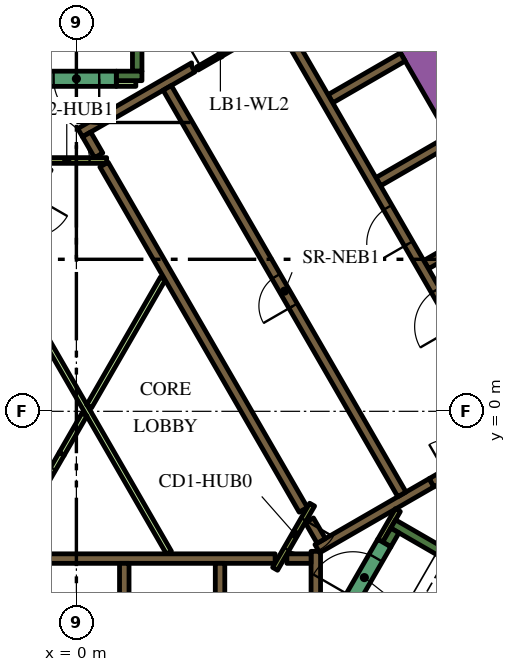
"""IFC4 building model, lengths in metres.
Left out: names, types, materials, properties, quantities, classifications, styles, units other than length and angle.
Written with IfcOpenShell. Run it as: python <this file> out.ifc"""

import sys

from ifc_helpers import new_model, si_unit, direction, frame, frame_2d, origin, place, context, subcontext, project, spatial, polyline, rectangle, outline, extrude, element, fill, save


model = new_model("IFC4")
c1 = context("Model", 3, precision=1e-05, world=origin(), true_north=direction((0.0, 1.0)))
c2 = subcontext(c1, "Body", "Model", "MODEL_VIEW")
j1 = project(units=[si_unit("LENGTHUNIT", "METRE"), si_unit("PLANEANGLEUNIT", "RADIAN")], contexts=[c1])
p1 = place(None, origin())
s1 = spatial("IfcSite", under=j1, at=p1, CompositionType="ELEMENT")
p2 = place(p1, origin())
s2 = spatial("IfcBuilding", under=s1, at=p2, CompositionType="ELEMENT")
p3 = place(p2, frame((0.0, 0.0, 43.2)))
s3 = spatial("IfcBuildingStorey", under=s2, at=p3, CompositionType="ELEMENT", Elevation=43.2)
p4 = place(p3, frame((6.776, 13.364, 0.0), z_axis=(0.0, 0.0, 1.0), x_axis=(0.500004177138, -0.8660229921, 0.0)))
e1 = element("IfcWall", 1, at=p4, inside=s3, PredefinedType="SOLIDWALL", context=c2, shape_type="SweptSolid", body=[
    extrude(rectangle(XDim=20.204, YDim=0.9, at=frame_2d((10.102, 0.0))), origin(), (0.0, 0.0, 1.0), 3.9),
])
p5 = place(p3, frame((8.334, -2.964, 0.0), z_axis=(0.0, 0.0, 1.0), x_axis=(0.866016039709, -0.500016218704, 0.0)))
e2 = element("IfcWall", 2, at=p5, inside=s3, PredefinedType="SOLIDWALL", context=c2, shape_type="SweptSolid", body=[
    extrude(rectangle(XDim=7.05, YDim=0.25, at=frame_2d((3.525, 0.0))), origin(), (0.0, 0.0, 1.0), 3.9),
])
p6 = place(p3, frame((8.168, -3.503, 0.0), z_axis=(0.0, 0.0, 1.0), x_axis=(0.49972245349, 0.866185586049, 0.0)))
e3 = element("IfcWall", 3, at=p6, inside=s3, PredefinedType="SOLIDWALL", context=c2, shape_type="SweptSolid", body=[
    extrude(rectangle(XDim=0.425, YDim=0.25, at=frame_2d((0.212, 0.0))), origin(), (0.0, 0.0, 1.0), 3.9),
])
p7 = place(p3, frame((1.6, 8.95, 0.0), z_axis=(0.0, 0.0, 1.0), x_axis=(0.0, 1.0, 0.0)))
e4 = element("IfcWall", 4, at=p7, inside=s3, PredefinedType="SOLIDWALL", context=c2, shape_type="SweptSolid", body=[
    extrude(rectangle(XDim=6.8, YDim=0.25, at=frame_2d((3.4, 0.0))), origin(), (0.0, 0.0, 1.0), 3.9),
])
p8 = place(p3, frame((1.05, 8.825, 0.0), z_axis=(0.0, 0.0, 1.0), x_axis=(1.0, 0.0, 0.0)))
e5 = element("IfcWall", 5, at=p8, inside=s3, PredefinedType="SOLIDWALL", context=c2, shape_type="SweptSolid", body=[
    extrude(rectangle(XDim=0.675, YDim=0.25, at=frame_2d((0.337, 0.0))), origin(), (0.0, 0.0, 1.0), 3.9),
])
p9 = place(p3, frame((-5.259, -3.875, 0.0), z_axis=(0.0, 0.0, 1.0), x_axis=(1.0, 0.0, 0.0)))
e6 = element("IfcWall", 6, at=p9, inside=s3, PredefinedType="SOLIDWALL", context=c2, shape_type="SweptSolid", body=[
    extrude(rectangle(XDim=10.489, YDim=0.25, at=frame_2d((5.244, 0.0))), origin(), (0.0, 0.0, 1.0), 3.9),
])
for number, where, z_axis, x_axis in (
    (7, (3.78, -4.0, 0.0), (0.0, 0.0, 1.0), (0.0, -1.0, 0.0)),
    (8, (1.26, -4.0, 0.0), (0.0, 0.0, 1.0), (0.0, -1.0, 0.0)),
):
    element("IfcWall", number, at=place(p3, frame(where, z_axis=z_axis, x_axis=x_axis)), inside=s3, PredefinedType="SOLIDWALL", context=c2, shape_type="SweptSolid", body=[
        extrude(rectangle(XDim=2.2, YDim=0.25, at=frame_2d((1.1, 0.0))), origin(), (0.0, 0.0, 1.0), 3.9),
    ])
p10 = place(p3, frame((6.3, -7.27, 0.0), z_axis=(0.0, 0.0, 1.0), x_axis=(0.0, 1.0, 0.0)))
e9 = element("IfcWall", 9, at=p10, inside=s3, PredefinedType="SOLIDWALL", context=c2, shape_type="SweptSolid", body=[
    extrude(rectangle(XDim=3.586, YDim=0.25, at=frame_2d((1.793, 0.0))), origin(), (0.0, 0.0, 1.0), 3.9),
])
p11 = place(p3, frame((5.538, -3.875, 0.0), z_axis=(0.0, 0.0, 1.0), x_axis=(1.0, 0.0, 0.0)))
e10 = element("IfcWall", 10, at=p11, inside=s3, PredefinedType="SOLIDWALL", context=c2, shape_type="SweptSolid", body=[
    extrude(rectangle(XDim=0.637, YDim=0.25, at=frame_2d((0.318, 0.0))), origin(), (0.0, 0.0, 1.0), 3.9),
])
p12 = place(p3, frame((9.346, -1.879, 0.0), z_axis=(0.0, 0.0, 1.0), x_axis=(-0.866048528039, -0.499959945477, 0.0)))
e11 = element("IfcWall", 11, at=p12, inside=s3, PredefinedType="SOLIDWALL", context=c2, shape_type="SweptSolid", body=[
    extrude(rectangle(XDim=3.47, YDim=0.25, at=frame_2d((1.735, 0.0))), origin(), (0.0, 0.0, 1.0), 3.9),
])
p13 = place(p3, frame((6.13, -2.867, 0.0), z_axis=(0.0, 0.0, 1.0), x_axis=(0.500160776593, -0.865932559475, 0.0)))
e12 = element("IfcWall", 12, at=p13, inside=s3, PredefinedType="SOLIDWALL", context=c2, shape_type="SweptSolid", body=[
    extrude(rectangle(XDim=0.627, YDim=0.25, at=frame_2d((0.313, 0.0))), origin(), (0.0, 0.0, 1.0), 3.9),
])
for number, where, z_axis, x_axis in (
    (13, (9.204, 3.859, 0.0), (0.0, 0.0, 1.0), (0.866, 0.5, 0.0)),
    (14, (7.944, 6.041, 0.0), (0.0, 0.0, 1.0), (0.866, 0.5, 0.0)),
    (15, (6.684, 8.224, 0.0), (0.0, 0.0, 1.0), (0.866, 0.5, 0.0)),
):
    element("IfcWall", number, at=place(p3, frame(where, z_axis=z_axis, x_axis=x_axis)), inside=s3, PredefinedType="SOLIDWALL", context=c2, shape_type="SweptSolid", body=[
        extrude(rectangle(XDim=2.2, YDim=0.25, at=frame_2d((1.1, 0.0))), origin(), (0.0, 0.0, 1.0), 3.9),
    ])
p14 = place(p3, origin())
e16 = element("IfcWall", 16, at=p14, inside=s3, PredefinedType="SOLIDWALL", context=c2, shape_type="SweptSolid", body=[
    extrude(outline(polyline([(2.776, 8.733), (2.499, 8.573), (2.498, 8.573), (2.498, 8.573), (2.282, 8.448), (2.282, 8.448), (0.377, 7.348), (0.16, 7.223), (0.035, 7.439), (3.032, 9.169), (3.03, 9.152), (3.03, 9.133), (3.031, 9.113), (3.035, 9.094), (3.04, 9.075), (3.047, 9.057), (3.056, 9.039), (3.119, 8.931), (2.776, 8.733)])), origin(), (0.0, 0.0, 1.0), 3.9),
])
p15 = place(p3, frame((0.268, 7.285, 0.0), z_axis=(0.0, 0.0, 1.0), x_axis=(0.500098681536, -0.865968422476, 0.0)))
e17 = element("IfcWall", 17, at=p15, inside=s3, PredefinedType="SOLIDWALL", context=c2, shape_type="SweptSolid", body=[
    extrude(rectangle(XDim=0.636, YDim=0.25, at=frame_2d((0.318, 0.0))), origin(), (0.0, 0.0, 1.0), 3.9),
])
p16 = place(p3, frame((5.97, -2.591, 0.0), z_axis=(0.0, 0.0, 1.0), x_axis=(-0.499994469932, 0.866028596547, 0.0)))
e18 = element("IfcWall", 18, at=p16, inside=s3, PredefinedType="SOLIDWALL", context=c2, shape_type="SweptSolid", body=[
    extrude(rectangle(XDim=10.488, YDim=0.25, at=frame_2d((5.244, 0.0))), origin(), (0.0, 0.0, 1.0), 3.9),
])
p17 = place(p3, frame((8.459, -2.599, 0.0), z_axis=(0.0, 0.0, 1.0), x_axis=(-0.500041054325, -0.866001699761, 0.0)))
e19 = element("IfcWall", 19, at=p17, inside=s3, PredefinedType="PARTITIONING", context=c2, shape_type="SweptSolid", body=[
    extrude(rectangle(XDim=0.929, YDim=0.15, at=frame_2d((0.464, 0.0))), origin(), (0.0, 0.0, 1.0), 3.9),
])
p18 = place(p3, frame((2.435, -3.718, 0.0), z_axis=(0.0, 0.0, 1.0), x_axis=(-0.499985176046, 0.866033962229, 0.0)))
e20 = element("IfcWall", 20, at=p18, inside=s3, PredefinedType="PARTITIONING", context=c2, shape_type="SweptSolid", body=[
    extrude(rectangle(XDim=8.875, YDim=0.15, at=frame_2d((4.438, 0.0))), origin(), (0.0, 0.0, 1.0), 2.75),
])
p19 = place(p3, frame((0.336, 0.132, 0.0), z_axis=(0.0, 0.0, 1.0), x_axis=(0.500001957507, 0.866024273614, 0.0)))
e21 = element("IfcWall", 21, at=p19, inside=s3, PredefinedType="PARTITIONING", context=c2, shape_type="SweptSolid", body=[
    extrude(rectangle(XDim=3.881, YDim=0.15, at=frame_2d((1.941, 0.0))), origin(), (0.0, 0.0, 1.0), 2.75),
])
p20 = place(p3, frame((-0.387, -1.121, 0.0), z_axis=(0.0, 0.0, 1.0), x_axis=(0.500057179532, 0.865992388649, 0.0)))
e22 = element("IfcWall", 22, at=p20, inside=s3, PredefinedType="PARTITIONING", context=c2, shape_type="SweptSolid", body=[
    extrude(rectangle(XDim=1.199, YDim=0.15, at=frame_2d((0.6, 0.0))), origin(), (0.0, 0.0, 1.0), 2.75),
])
p21 = place(p3, frame((1.05, 8.625, 0.0), z_axis=(0.0, 0.0, 1.0), x_axis=(1.0, 0.0, 0.0)))
e23 = element("IfcWall", 23, at=p21, inside=s3, PredefinedType="PARTITIONING", context=c2, shape_type="SweptSolid", body=[
    extrude(rectangle(XDim=0.514, YDim=0.15, at=frame_2d((0.257, 0.0))), origin(), (0.0, 0.0, 1.0), 2.75),
])
p22 = place(p3, frame((11.553, -0.46, 0.0), z_axis=(0.0, 0.0, 1.0), x_axis=(-0.500006514828, 0.866021642414, 0.0)))
e24 = element("IfcWall", 24, at=p22, inside=s3, PredefinedType="SOLIDWALL", context=c2, shape_type="SweptSolid", body=[
    extrude(rectangle(XDim=12.35, YDim=0.25, at=frame_2d((6.175, 0.0))), origin(), (0.0, 0.0, 1.0), 3.9),
])
p23 = place(p22, frame((0.585, 0.0, 0.0)))
e25 = element("IfcOpeningElement", 25, at=p23, cuts=e24, PredefinedType="OPENING", context=c2, shape_type="SweptSolid", body=[
    extrude(rectangle(XDim=1.1, YDim=2.1, at=frame_2d((0.55, 1.05))), frame((0.0, 0.135, 0.0), z_axis=(0.0, -1.0, 0.0), x_axis=(1.0, 0.0, 0.0)), (0.0, 0.0, 1.0), 0.27),
])
p24 = place(p22, frame((3.105, 0.0, 0.0)))
e26 = element("IfcOpeningElement", 26, at=p24, cuts=e24, PredefinedType="OPENING", context=c2, shape_type="SweptSolid", body=[
    extrude(rectangle(XDim=1.1, YDim=2.1, at=frame_2d((0.55, 1.05))), frame((0.0, 0.135, 0.0), z_axis=(0.0, -1.0, 0.0), x_axis=(1.0, 0.0, 0.0)), (0.0, 0.0, 1.0), 0.27),
])
p25 = place(p22, frame((5.625, 0.0, 0.0)))
e27 = element("IfcOpeningElement", 27, at=p25, cuts=e24, PredefinedType="OPENING", context=c2, shape_type="SweptSolid", body=[
    extrude(rectangle(XDim=1.1, YDim=2.1, at=frame_2d((0.55, 1.05))), frame((0.0, 0.135, 0.0), z_axis=(0.0, -1.0, 0.0), x_axis=(1.0, 0.0, 0.0)), (0.0, 0.0, 1.0), 0.27),
])
p26 = place(p3, frame((8.565, -2.185, 0.0), z_axis=(0.0, 0.0, 1.0), x_axis=(-0.499997954832, 0.866026584559, 0.0)))
e28 = element("IfcWall", 28, at=p26, inside=s3, PredefinedType="SOLIDWALL", context=c2, shape_type="SweptSolid", body=[
    extrude(rectangle(XDim=12.35, YDim=0.25, at=frame_2d((6.175, 0.0))), origin(), (0.0, 0.0, 1.0), 3.9),
])
p27 = place(p26, frame((5.725, 0.0, 0.0)))
e29 = element("IfcOpeningElement", 29, at=p27, cuts=e28, PredefinedType="OPENING", context=c2, shape_type="SweptSolid", body=[
    extrude(rectangle(XDim=0.9, YDim=2.1, at=frame_2d((0.45, 1.05))), frame((0.0, 0.135, 0.0), z_axis=(0.0, -1.0, 0.0), x_axis=(1.0, 0.0, 0.0)), (0.0, 0.0, 1.0), 0.27),
])
p28 = place(p3, frame((7.053, -5.284, 0.0), z_axis=(0.0, 0.0, 1.0), x_axis=(0.500078061341, 0.865980330357, 0.0)))
e30 = element("IfcWall", 30, at=p28, inside=s3, PredefinedType="SOLIDWALL", context=c2, shape_type="SweptSolid", body=[
    extrude(rectangle(XDim=2.1, YDim=0.4, at=frame_2d((1.05, 0.0))), origin(), (0.0, 0.0, 1.0), 3.9),
])
p29 = place(p28, frame((0.45, 0.0, 0.0)))
e31 = element("IfcOpeningElement", 31, at=p29, cuts=e30, PredefinedType="OPENING", context=c2, shape_type="SweptSolid", body=[
    extrude(rectangle(XDim=1.2, YDim=2.1, at=frame_2d((0.6, 1.05))), frame((0.0, 0.21, 0.0), z_axis=(0.0, -1.0, 0.0), x_axis=(1.0, 0.0, 0.0)), (0.0, 0.0, 1.0), 0.42),
])
p30 = place(p3, frame((9.346, -1.879, 0.0), z_axis=(0.0, 0.0, 1.0), x_axis=(0.866047807691, 0.499961193289, 0.0)))
e32 = element("IfcWall", 32, at=p30, inside=s3, PredefinedType="SOLIDWALL", context=c2, shape_type="SweptSolid", body=[
    extrude(rectangle(XDim=1.8, YDim=0.25, at=frame_2d((0.9, 0.0))), origin(), (0.0, 0.0, 1.0), 3.9),
])
p31 = place(p30, frame((0.45, 0.0, 0.0)))
e33 = element("IfcOpeningElement", 33, at=p31, cuts=e32, PredefinedType="OPENING", context=c2, shape_type="SweptSolid", body=[
    extrude(rectangle(XDim=0.9, YDim=2.1, at=frame_2d((0.45, 1.05))), frame((0.0, 0.135, 0.0), z_axis=(0.0, -1.0, 0.0), x_axis=(1.0, 0.0, 0.0)), (0.0, 0.0, 1.0), 0.27),
])
p32 = place(p3, frame((1.05, 8.75, 0.0), z_axis=(0.0, 0.0, 1.0), x_axis=(-1.0, 0.0, 0.0)))
e34 = element("IfcWall", 34, at=p32, inside=s3, PredefinedType="SOLIDWALL", context=c2, shape_type="SweptSolid", body=[
    extrude(rectangle(XDim=2.1, YDim=0.4, at=frame_2d((1.05, 0.0))), origin(), (0.0, 0.0, 1.0), 3.9),
])
p33 = place(p32, frame((0.45, 0.0, 0.0)))
e35 = element("IfcOpeningElement", 35, at=p33, cuts=e34, PredefinedType="OPENING", context=c2, shape_type="SweptSolid", body=[
    extrude(rectangle(XDim=1.2, YDim=2.1, at=frame_2d((0.6, 1.05))), frame((0.0, 0.21, 0.0), z_axis=(0.0, -1.0, 0.0), x_axis=(1.0, 0.0, 0.0)), (0.0, 0.0, 1.0), 0.42),
])
p34 = place(p3, frame((6.203, -2.456, 0.0), z_axis=(0.0, 0.0, 1.0), x_axis=(-0.500043961785, -0.866000020948, 0.0)))
e36 = element("IfcWall", 36, at=p34, inside=s3, PredefinedType="PARTITIONING", context=c2, shape_type="SweptSolid", body=[
    extrude(rectangle(XDim=1.95, YDim=0.15, at=frame_2d((0.975, 0.0))), origin(), (0.0, 0.0, 1.0), 3.9),
])
p35 = place(p34, frame((0.45, 0.0, 0.0)))
e37 = element("IfcOpeningElement", 37, at=p35, cuts=e36, PredefinedType="OPENING", context=c2, shape_type="SweptSolid", body=[
    extrude(rectangle(XDim=0.9, YDim=2.1, at=frame_2d((0.45, 1.05))), frame((0.0, 0.085, 0.0), z_axis=(0.0, -1.0, 0.0), x_axis=(1.0, 0.0, 0.0)), (0.0, 0.0, 1.0), 0.17),
])
p36 = place(p3, frame((-1.303, 6.6, 0.0), z_axis=(0.0, 0.0, 1.0), x_axis=(1.0, 0.0, 0.0)))
e38 = element("IfcWall", 38, at=p36, inside=s3, PredefinedType="PARTITIONING", context=c2, shape_type="SweptSolid", body=[
    extrude(rectangle(XDim=2.1, YDim=0.15, at=frame_2d((1.05, 0.0))), origin(), (0.0, 0.0, 1.0), 3.9),
])
p37 = place(p36, frame((0.45, 0.0, 0.0)))
e39 = element("IfcOpeningElement", 39, at=p37, cuts=e38, PredefinedType="OPENING", context=c2, shape_type="SweptSolid", body=[
    extrude(rectangle(XDim=1.2, YDim=2.1, at=frame_2d((0.6, 1.05))), frame((0.0, 0.085, 0.0), z_axis=(0.0, -1.0, 0.0), x_axis=(1.0, 0.0, 0.0)), (0.0, 0.0, 1.0), 0.17),
])
p38 = place(p3, frame((3.183, 9.02, 0.0), z_axis=(0.0, 0.0, 1.0), x_axis=(0.866034573852, 0.49998411664, 0.0)))
e40 = element("IfcWall", 40, at=p38, inside=s3, PredefinedType="PARTITIONING", context=c2, shape_type="SweptSolid", body=[
    extrude(rectangle(XDim=1.4, YDim=0.09, at=frame_2d((0.7, 0.0))), origin(), (0.0, 0.0, 1.0), 2.75),
])
p39 = place(p38, frame((0.1, 0.0, 0.0)))
e41 = element("IfcOpeningElement", 41, at=p39, cuts=e40, PredefinedType="OPENING", context=c2, shape_type="SweptSolid", body=[
    extrude(rectangle(XDim=1.2, YDim=2.1, at=frame_2d((0.6, 1.05))), frame((0.0, 0.055, 0.0), z_axis=(0.0, -1.0, 0.0), x_axis=(1.0, 0.0, 0.0)), (0.0, 0.0, 1.0), 0.11),
])
p40 = place(p3, frame((-1.287, -2.679, 0.0), z_axis=(0.0, 0.0, 1.0), x_axis=(0.499961193289, 0.866047807691, 0.0)))
e42 = element("IfcWall", 42, at=p40, inside=s3, PredefinedType="PARTITIONING", context=c2, shape_type="SweptSolid", body=[
    extrude(rectangle(XDim=1.8, YDim=0.15, at=frame_2d((0.9, 0.0))), origin(), (0.0, 0.0, 1.0), 2.75),
])
p41 = place(p40, frame((0.45, 0.0, 0.0)))
e43 = element("IfcOpeningElement", 43, at=p41, cuts=e42, PredefinedType="OPENING", context=c2, shape_type="SweptSolid", body=[
    extrude(rectangle(XDim=0.9, YDim=2.1, at=frame_2d((0.45, 1.05))), frame((0.0, 0.085, 0.0), z_axis=(0.0, -1.0, 0.0), x_axis=(1.0, 0.0, 0.0)), (0.0, 0.0, 1.0), 0.17),
])
p42 = place(p3, frame((6.163, 18.475, 0.0), z_axis=(0.0, 0.0, 1.0), x_axis=(0.500001317485, -0.866024643133, 0.0)))
e44 = element("IfcWall", 44, at=p42, inside=s3, PredefinedType="PARTITIONING", context=c2, shape_type="SweptSolid", body=[
    extrude(rectangle(XDim=25.767, YDim=0.15, at=frame_2d((12.883, 0.0))), origin(), (0.0, 0.0, 1.0), 2.75),
])
p43 = place(p42, frame((24.586, 0.0, 0.0)))
e45 = element("IfcOpeningElement", 45, at=p43, cuts=e44, PredefinedType="OPENING", context=c2, shape_type="SweptSolid", body=[
    extrude(rectangle(XDim=1.0, YDim=2.1, at=frame_2d((0.5, 1.05))), frame((0.0, 0.085, 0.0), z_axis=(0.0, -1.0, 0.0), x_axis=(1.0, 0.0, 0.0)), (0.0, 0.0, 1.0), 0.17),
])
p44 = place(p42, frame((16.196, 0.0, 0.0)))
e46 = element("IfcOpeningElement", 46, at=p44, cuts=e44, PredefinedType="OPENING", context=c2, shape_type="SweptSolid", body=[
    extrude(rectangle(XDim=1.0, YDim=2.1, at=frame_2d((0.5, 1.05))), frame((0.0, 0.085, 0.0), z_axis=(0.0, -1.0, 0.0), x_axis=(1.0, 0.0, 0.0)), (0.0, 0.0, 1.0), 0.17),
])
p45 = place(p42, frame((14.789, 0.0, 0.0)))
e47 = element("IfcOpeningElement", 47, at=p45, cuts=e44, PredefinedType="OPENING", context=c2, shape_type="SweptSolid", body=[
    extrude(rectangle(XDim=1.1, YDim=2.1, at=frame_2d((0.55, 1.05))), frame((0.0, 0.085, 0.0), z_axis=(0.0, -1.0, 0.0), x_axis=(1.0, 0.0, 0.0)), (0.0, 0.0, 1.0), 0.17),
])
p46 = place(p42, frame((3.698, 0.0, 0.0)))
e48 = element("IfcOpeningElement", 48, at=p46, cuts=e44, PredefinedType="OPENING", context=c2, shape_type="SweptSolid", body=[
    extrude(rectangle(XDim=1.0, YDim=2.1, at=frame_2d((0.5, 1.05))), frame((0.0, 0.085, 0.0), z_axis=(0.0, -1.0, 0.0), x_axis=(1.0, 0.0, 0.0)), (0.0, 0.0, 1.0), 0.17),
])
p47 = place(p42, frame((2.391, 0.0, 0.0)))
e49 = element("IfcOpeningElement", 49, at=p47, cuts=e44, PredefinedType="OPENING", context=c2, shape_type="SweptSolid", body=[
    extrude(rectangle(XDim=1.0, YDim=2.1, at=frame_2d((0.5, 1.05))), frame((0.0, 0.085, 0.0), z_axis=(0.0, -1.0, 0.0), x_axis=(1.0, 0.0, 0.0)), (0.0, 0.0, 1.0), 0.17),
])
p48 = place(p24, origin())
e50 = element("IfcDoor", 50, at=p48, inside=s3, OperationType="DOUBLE_DOOR_SLIDING", PredefinedType="DOOR", context=c2, shape_type="SweptSolid", body=[
    extrude(rectangle(XDim=1.1, YDim=2.1, at=frame_2d((0.55, 1.05))), frame((0.0, 0.025, 0.0), z_axis=(0.0, -1.0, 0.0), x_axis=(1.0, 0.0, 0.0)), (0.0, 0.0, 1.0), 0.05),
])
fill(e26, e50)
p49 = place(p25, origin())
e51 = element("IfcDoor", 51, at=p49, inside=s3, OperationType="DOUBLE_DOOR_SLIDING", PredefinedType="DOOR", context=c2, shape_type="SweptSolid", body=[
    extrude(rectangle(XDim=1.1, YDim=2.1, at=frame_2d((0.55, 1.05))), frame((0.0, 0.025, 0.0), z_axis=(0.0, -1.0, 0.0), x_axis=(1.0, 0.0, 0.0)), (0.0, 0.0, 1.0), 0.05),
])
fill(e27, e51)
p50 = place(p27, origin())
e52 = element("IfcDoor", 52, at=p50, inside=s3, OperationType="SINGLE_SWING_LEFT", PredefinedType="DOOR", context=c2, shape_type="SweptSolid", body=[
    extrude(rectangle(XDim=0.9, YDim=2.1, at=frame_2d((0.45, 1.05))), frame((0.0, 0.025, 0.0), z_axis=(0.0, -1.0, 0.0), x_axis=(1.0, 0.0, 0.0)), (0.0, 0.0, 1.0), 0.05),
])
fill(e29, e52)
p51 = place(p29, origin())
e53 = element("IfcDoor", 53, at=p51, inside=s3, OperationType="SINGLE_SWING_LEFT", PredefinedType="DOOR", context=c2, shape_type="SweptSolid", body=[
    extrude(rectangle(XDim=1.2, YDim=2.1, at=frame_2d((0.6, 1.05))), frame((0.0, 0.025, 0.0), z_axis=(0.0, -1.0, 0.0), x_axis=(1.0, 0.0, 0.0)), (0.0, 0.0, 1.0), 0.05),
])
fill(e31, e53)
p52 = place(p33, origin())
e54 = element("IfcDoor", 54, at=p52, inside=s3, OperationType="SINGLE_SWING_LEFT", PredefinedType="DOOR", context=c2, shape_type="SweptSolid", body=[
    extrude(rectangle(XDim=1.2, YDim=2.1, at=frame_2d((0.6, 1.05))), frame((0.0, 0.025, 0.0), z_axis=(0.0, -1.0, 0.0), x_axis=(1.0, 0.0, 0.0)), (0.0, 0.0, 1.0), 0.05),
])
fill(e35, e54)
p53 = place(p35, origin())
e55 = element("IfcDoor", 55, at=p53, inside=s3, OperationType="SINGLE_SWING_LEFT", PredefinedType="DOOR", context=c2, shape_type="SweptSolid", body=[
    extrude(rectangle(XDim=0.9, YDim=2.1, at=frame_2d((0.45, 1.05))), frame((0.0, 0.025, 0.0), z_axis=(0.0, -1.0, 0.0), x_axis=(1.0, 0.0, 0.0)), (0.0, 0.0, 1.0), 0.05),
])
fill(e37, e55)
p54 = place(p37, origin())
e56 = element("IfcDoor", 56, at=p54, inside=s3, OperationType="SINGLE_SWING_LEFT", PredefinedType="DOOR", context=c2, shape_type="SweptSolid", body=[
    extrude(rectangle(XDim=1.2, YDim=2.1, at=frame_2d((0.6, 1.05))), frame((0.0, 0.025, 0.0), z_axis=(0.0, -1.0, 0.0), x_axis=(1.0, 0.0, 0.0)), (0.0, 0.0, 1.0), 0.05),
])
fill(e39, e56)
p55 = place(p39, origin())
e57 = element("IfcDoor", 57, at=p55, inside=s3, OperationType="SINGLE_SWING_LEFT", PredefinedType="DOOR", context=c2, shape_type="SweptSolid", body=[
    extrude(rectangle(XDim=1.2, YDim=2.1, at=frame_2d((0.6, 1.05))), frame((0.0, 0.025, 0.0), z_axis=(0.0, -1.0, 0.0), x_axis=(1.0, 0.0, 0.0)), (0.0, 0.0, 1.0), 0.05),
])
fill(e41, e57)
p56 = place(p41, origin())
e58 = element("IfcDoor", 58, at=p56, inside=s3, OperationType="SINGLE_SWING_LEFT", PredefinedType="DOOR", context=c2, shape_type="SweptSolid", body=[
    extrude(rectangle(XDim=0.9, YDim=2.1, at=frame_2d((0.45, 1.05))), frame((0.0, 0.025, 0.0), z_axis=(0.0, -1.0, 0.0), x_axis=(1.0, 0.0, 0.0)), (0.0, 0.0, 1.0), 0.05),
])
fill(e43, e58)
save(model, sys.argv[1])
